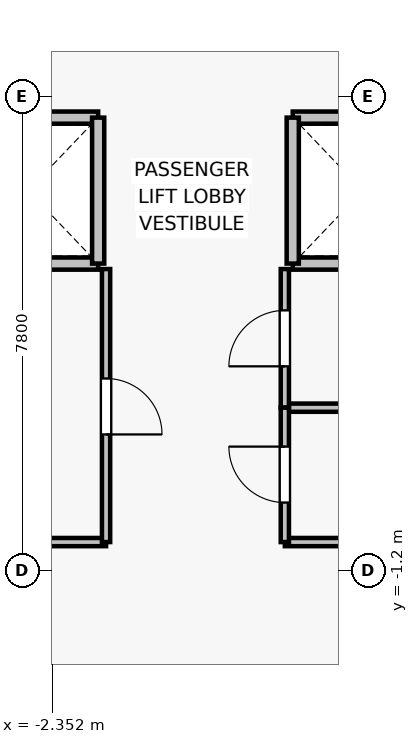
"""IFC4 building model, lengths in metres.
Left out: names, types, materials, properties, quantities, classifications, styles, units other than length and angle.
Written with IfcOpenShell. Run it as: python <this file> out.ifc"""

import sys

from ifc_helpers import new_model, si_unit, direction, frame, frame_2d, origin, place, context, subcontext, project, spatial, rectangle, extrude, source, transform, mapped, element, fill, save


model = new_model("IFC4")
c1 = context("Model", 3, precision=1e-05, world=origin(), true_north=direction((0.0, 1.0)))
c2 = subcontext(c1, "Body", "Model", "MODEL_VIEW")
j1 = project(units=[si_unit("LENGTHUNIT", "METRE"), si_unit("PLANEANGLEUNIT", "RADIAN")], contexts=[c1])
p1 = place(None, origin())
s1 = spatial("IfcSite", under=j1, at=p1, CompositionType="ELEMENT")
p2 = place(p1, origin())
s2 = spatial("IfcBuilding", under=s1, at=p2, CompositionType="ELEMENT")
p3 = place(p2, frame((0.0, 0.0, 18.2)))
s3 = spatial("IfcBuildingStorey", under=s2, at=p3, CompositionType="ELEMENT", Elevation=18.2)
for number, where, z_axis, x_axis in (
    (1, (-1.6, 3.85, 0.0), (0.0, 0.0, 1.0), (-1.0, 0.0, 0.0)),
    (2, (-3.9, 6.25, 0.0), (0.0, 0.0, 1.0), (1.0, 0.0, 0.0)),
):
    element("IfcWall", number, at=place(p3, frame(where, z_axis=z_axis, x_axis=x_axis)), inside=s3, PredefinedType="SOLIDWALL", context=c2, shape_type="SweptSolid", body=[
        extrude(rectangle(XDim=2.3, YDim=0.2, at=frame_2d((1.15, 0.0))), origin(), (0.0, 0.0, 1.0), 4.1),
    ])
p4 = place(p3, frame((-1.6, 6.25, 0.0), z_axis=(0.0, 0.0, 1.0), x_axis=(0.0, -1.0, 0.0)))
e3 = element("IfcWall", 3, at=p4, inside=s3, PredefinedType="SOLIDWALL", context=c2, shape_type="SweptSolid", body=[
    extrude(rectangle(XDim=2.4, YDim=0.2, at=frame_2d((1.2, 0.0))), origin(), (0.0, 0.0, 1.0), 4.1),
])
for number, where, z_axis, x_axis in (
    (4, (3.9, 3.85, 0.0), (0.0, 0.0, 1.0), (-1.0, 0.0, 0.0)),
    (5, (1.6, 6.25, 0.0), (0.0, 0.0, 1.0), (1.0, 0.0, 0.0)),
):
    element("IfcWall", number, at=place(p3, frame(where, z_axis=z_axis, x_axis=x_axis)), inside=s3, PredefinedType="SOLIDWALL", context=c2, shape_type="SweptSolid", body=[
        extrude(rectangle(XDim=2.3, YDim=0.2, at=frame_2d((1.15, 0.0))), origin(), (0.0, 0.0, 1.0), 4.1),
    ])
p5 = place(p3, frame((1.6, 3.85, 0.0), z_axis=(0.0, 0.0, 1.0), x_axis=(0.0, 1.0, 0.0)))
e6 = element("IfcWall", 6, at=p5, inside=s3, PredefinedType="SOLIDWALL", context=c2, shape_type="SweptSolid", body=[
    extrude(rectangle(XDim=2.4, YDim=0.2, at=frame_2d((1.2, 0.0))), origin(), (0.0, 0.0, 1.0), 4.1),
])
p6 = place(p3, frame((-1.47, -0.73, 0.0), z_axis=(0.0, 0.0, 1.0), x_axis=(-1.0, 0.0, 0.0)))
e7 = element("IfcWall", 7, at=p6, inside=s3, PredefinedType="PARTITIONING", context=c2, shape_type="SweptSolid", body=[
    extrude(rectangle(XDim=5.11, YDim=0.135, at=frame_2d((2.555, 0.0))), origin(), (0.0, 0.0, 1.0), 4.1),
])
p7 = place(p3, frame((-1.47, 3.76, 0.0), z_axis=(0.0, 0.0, 1.0), x_axis=(0.0, -1.0, 0.0)))
e8 = element("IfcWall", 8, at=p7, inside=s3, PredefinedType="PARTITIONING", context=c2, shape_type="SweptSolid", body=[
    extrude(rectangle(XDim=4.49, YDim=0.135, at=frame_2d((2.245, 0.0))), origin(), (0.0, 0.0, 1.0), 3.473),
])
p8 = place(p7, frame((1.8, 0.0, 0.0)))
e9 = element("IfcOpeningElement", 9, at=p8, cuts=e8, PredefinedType="OPENING", context=c2, shape_type="SweptSolid", body=[
    extrude(rectangle(XDim=0.92, YDim=2.1, at=frame_2d((0.46, 1.05))), frame((0.0, 0.077, 0.0), z_axis=(0.0, -1.0, 0.0), x_axis=(1.0, 0.0, 0.0)), (0.0, 0.0, 1.0), 0.155),
])
p9 = place(p3, frame((6.58, 1.48, 0.0), z_axis=(0.0, 0.0, 1.0), x_axis=(-1.0, 0.0, 0.0)))
e10 = element("IfcWall", 10, at=p9, inside=s3, PredefinedType="PARTITIONING", context=c2, shape_type="SweptSolid", body=[
    extrude(rectangle(XDim=5.11, YDim=0.135, at=frame_2d((2.555, 0.0))), origin(), (0.0, 0.0, 1.0), 4.1),
])
p10 = place(p3, frame((1.47, 1.48, 0.0), z_axis=(0.0, 0.0, 1.0), x_axis=(0.0, 1.0, 0.0)))
e11 = element("IfcWall", 11, at=p10, inside=s3, PredefinedType="PARTITIONING", context=c2, shape_type="SweptSolid", body=[
    extrude(rectangle(XDim=2.28, YDim=0.135, at=frame_2d((1.14, 0.0))), origin(), (0.0, 0.0, 1.0), 3.473),
])
p11 = place(p10, frame((0.68, 0.0, 0.0)))
e12 = element("IfcOpeningElement", 12, at=p11, cuts=e11, PredefinedType="OPENING", context=c2, shape_type="SweptSolid", body=[
    extrude(rectangle(XDim=0.92, YDim=2.1, at=frame_2d((0.46, 1.05))), frame((0.0, 0.077, 0.0), z_axis=(0.0, -1.0, 0.0), x_axis=(1.0, 0.0, 0.0)), (0.0, 0.0, 1.0), 0.155),
])
p12 = place(p3, frame((4.18, -0.73, 0.0), z_axis=(0.0, 0.0, 1.0), x_axis=(-1.0, 0.0, 0.0)))
e13 = element("IfcWall", 13, at=p12, inside=s3, PredefinedType="PARTITIONING", context=c2, shape_type="SweptSolid", body=[
    extrude(rectangle(XDim=2.71, YDim=0.135, at=frame_2d((1.355, 0.0))), origin(), (0.0, 0.0, 1.0), 4.1),
])
p13 = place(p3, frame((1.47, -0.73, 0.0), z_axis=(0.0, 0.0, 1.0), x_axis=(0.0, 1.0, 0.0)))
e14 = element("IfcWall", 14, at=p13, inside=s3, PredefinedType="PARTITIONING", context=c2, shape_type="SweptSolid", body=[
    extrude(rectangle(XDim=2.21, YDim=0.135, at=frame_2d((1.105, 0.0))), origin(), (0.0, 0.0, 1.0), 4.1),
])
p14 = place(p13, frame((0.65, 0.0, 0.0)))
e15 = element("IfcOpeningElement", 15, at=p14, cuts=e14, PredefinedType="OPENING", context=c2, shape_type="SweptSolid", body=[
    extrude(rectangle(XDim=0.92, YDim=2.1, at=frame_2d((0.46, 1.05))), frame((0.0, 0.077, 0.0), z_axis=(0.0, -1.0, 0.0), x_axis=(1.0, 0.0, 0.0)), (0.0, 0.0, 1.0), 0.155),
])
m1 = source(origin(), c2, "Body", "SweptSolid", [
    extrude(rectangle(XDim=0.92, YDim=2.1, at=frame_2d((0.46, 1.05))), frame((0.0, 0.025, 0.0), z_axis=(0.0, -1.0, 0.0), x_axis=(1.0, 0.0, 0.0)), (0.0, 0.0, 1.0), 0.05),
])
p15 = place(p8, origin())
e16 = element("IfcDoor", 16, at=p15, inside=s3, OperationType="SINGLE_SWING_RIGHT", PredefinedType="DOOR", context=c2, shape_type="MappedRepresentation", body=[
    mapped(m1, transform((0.0, 0.0, 0.0), x_axis=(1.0, 0.0, 0.0), y_axis=(0.0, 1.0, 0.0), z_axis=(0.0, 0.0, 1.0), scale=1.0)),
])
fill(e9, e16)
p16 = place(p11, origin())
e17 = element("IfcDoor", 17, at=p16, inside=s3, OperationType="SINGLE_SWING_LEFT", PredefinedType="DOOR", context=c2, shape_type="MappedRepresentation", body=[
    mapped(m1, transform((0.0, 0.0, 0.0), x_axis=(1.0, 0.0, 0.0), y_axis=(0.0, 1.0, 0.0), z_axis=(0.0, 0.0, 1.0), scale=1.0)),
])
fill(e12, e17)
p17 = place(p14, origin())
e18 = element("IfcDoor", 18, at=p17, inside=s3, OperationType="SINGLE_SWING_RIGHT", PredefinedType="DOOR", context=c2, shape_type="MappedRepresentation", body=[
    mapped(m1, transform((0.0, 0.0, 0.0), x_axis=(1.0, 0.0, 0.0), y_axis=(0.0, 1.0, 0.0), z_axis=(0.0, 0.0, 1.0), scale=1.0)),
])
fill(e15, e18)
save(model, sys.argv[1])
